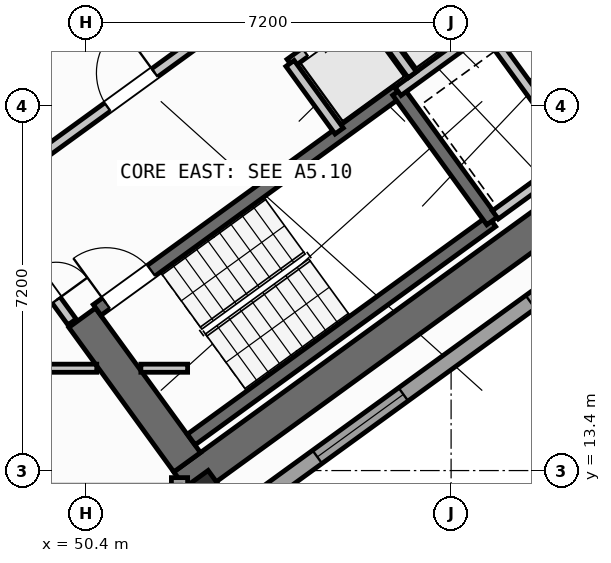
"""IFC4 building model, lengths in metres.
Left out: names, types, materials, properties, quantities, classifications, styles, units other than length and angle.
Written with IfcOpenShell. Run it as: python <this file> out.ifc"""

import sys

from ifc_helpers import new_model, si_unit, direction, frame, frame_2d, origin, origin_2d, place, context, subcontext, project, spatial, rectangle, hollow_rectangle, extrude, source, transform, mapped, element, fill, save


model = new_model("IFC4")
c1 = context("Model", 3, precision=1e-05, world=origin(), true_north=direction((0.0, 1.0)))
c2 = subcontext(c1, "Body", "Model", "MODEL_VIEW")
j1 = project(units=[si_unit("LENGTHUNIT", "METRE"), si_unit("PLANEANGLEUNIT", "RADIAN")], contexts=[c1])
p1 = place(None, origin())
s1 = spatial("IfcSite", under=j1, at=p1, CompositionType="ELEMENT")
p2 = place(p1, origin())
s2 = spatial("IfcBuilding", under=s1, at=p2, CompositionType="ELEMENT")
p3 = place(p2, frame((0.0, 0.0, 97.2)))
s3 = spatial("IfcBuildingStorey", under=s2, at=p3, CompositionType="ELEMENT", Elevation=97.2)
p4 = place(p3, frame((52.318, 13.11, 0.0), z_axis=(0.0, 0.0, 1.0), x_axis=(0.809019445368, 0.587781878776, 0.0)))
e1 = element("IfcWall", 1, at=p4, inside=s3, PredefinedType="SHEAR", context=c2, shape_type="SweptSolid", body=[
    extrude(rectangle(XDim=12.44, YDim=0.65, at=frame_2d((6.22, 0.0))), origin(), (0.0, 0.0, 1.0), 3.32),
])
p5 = place(p3, frame((52.39, 13.564, 0.0), z_axis=(0.0, 0.0, 1.0), x_axis=(-0.58779688989, 0.809008539037, 0.0)))
e2 = element("IfcWall", 2, at=p5, inside=s3, PredefinedType="SHEAR", context=c2, shape_type="SweptSolid", body=[
    extrude(rectangle(XDim=3.525, YDim=0.65, at=frame_2d((1.763, 0.0))), origin(), (0.0, 0.0, 1.0), 3.32),
])
m1 = source(origin(), c2, "Body", "SweptSolid", [
    extrude(hollow_rectangle(XDim=0.9, YDim=0.9, WallThickness=0.036, at=origin_2d()), origin(), (0.0, 0.0, 1.0), 3.6),
])
p6 = place(p3, frame((52.705, 12.773, 0.0), z_axis=(0.0, 0.0, 1.0), x_axis=(0.809016994375, 0.587785252292, 0.0)))
e3 = element("IfcColumn", 3, at=p6, inside=s3, PredefinedType="COLUMN", context=c2, shape_type="MappedRepresentation", body=[
    mapped(m1, transform((0.0, 0.0, 0.0), scale=1.0)),
])
p7 = place(p3, frame((67.454, 22.747, 0.0), z_axis=(0.0, 0.0, 1.0), x_axis=(-0.809021120468, -0.587779573171, 0.0)))
e4 = element("IfcWall", 4, at=p7, inside=s3, PredefinedType="STANDARD", context=c2, shape_type="SweptSolid", body=[
    extrude(rectangle(XDim=17.588, YDim=0.32, at=frame_2d((8.794, 0.0))), origin(), (0.0, 0.0, 1.0), 3.32),
])
p8 = place(p7, frame((1.624, 0.0, 0.0)))
e5 = element("IfcOpeningElement", 5, at=p8, cuts=e4, PredefinedType="OPENING", context=c2, shape_type="SweptSolid", body=[
    extrude(rectangle(XDim=1.05, YDim=2.15, at=frame_2d((0.525, 1.075))), frame((0.0, 0.17, 0.0), z_axis=(0.0, -1.0, 0.0), x_axis=(1.0, 0.0, 0.0)), (0.0, 0.0, 1.0), 0.34),
])
p9 = place(p7, frame((8.144, 0.0, 0.8)))
e6 = element("IfcOpeningElement", 6, at=p9, cuts=e4, PredefinedType="OPENING", context=c2, shape_type="SweptSolid", body=[
    extrude(rectangle(XDim=2.1, YDim=1.55, at=frame_2d((1.05, 0.775))), frame((0.0, 0.17, 0.0), z_axis=(0.0, -1.0, 0.0), x_axis=(1.0, 0.0, 0.0)), (0.0, 0.0, 1.0), 0.34),
])
p10 = place(p7, frame((13.344, 0.0, 0.8)))
e7 = element("IfcOpeningElement", 7, at=p10, cuts=e4, PredefinedType="OPENING", context=c2, shape_type="SweptSolid", body=[
    extrude(rectangle(XDim=2.1, YDim=1.55, at=frame_2d((1.05, 0.775))), frame((0.0, 0.17, 0.0), z_axis=(0.0, -1.0, 0.0), x_axis=(1.0, 0.0, 0.0)), (0.0, 0.0, 1.0), 0.34),
])
p11 = place(p3, frame((52.24, 13.261, 0.0), z_axis=(0.0, 0.0, 1.0), x_axis=(0.0, -1.0, 0.0)))
e8 = element("IfcWall", 8, at=p11, inside=s3, PredefinedType="STANDARD", context=c2, shape_type="SweptSolid", body=[
    extrude(rectangle(XDim=9.795, YDim=0.32, at=frame_2d((4.897, 0.0))), origin(), (0.0, 0.0, 1.0), 3.32),
])
p12 = place(p11, frame((2.307, 0.0, 0.8)))
e9 = element("IfcOpeningElement", 9, at=p12, cuts=e8, PredefinedType="OPENING", context=c2, shape_type="SweptSolid", body=[
    extrude(rectangle(XDim=2.1, YDim=1.55, at=frame_2d((1.05, 0.775))), frame((0.0, 0.17, 0.0), z_axis=(0.0, -1.0, 0.0), x_axis=(1.0, 0.0, 0.0)), (0.0, 0.0, 1.0), 0.34),
])
p13 = place(p11, frame((7.03, 0.0, 0.85)))
e10 = element("IfcOpeningElement", 10, at=p13, cuts=e8, PredefinedType="OPENING", context=c2, shape_type="SweptSolid", body=[
    extrude(rectangle(XDim=1.8, YDim=1.5, at=frame_2d((0.9, 0.75))), frame((0.0, 0.17, 0.0), z_axis=(0.0, -1.0, 0.0), x_axis=(1.0, 0.0, 0.0)), (0.0, 0.0, 1.0), 0.34),
])
p14 = place(p3, frame((52.472, 14.013, 0.0), z_axis=(0.0, 0.0, 1.0), x_axis=(0.809028366311, 0.587769599847, 0.0)))
e11 = element("IfcWall", 11, at=p14, inside=s3, PredefinedType="SHEAR", context=c2, shape_type="SweptSolid", body=[
    extrude(rectangle(XDim=7.33, YDim=0.26, at=frame_2d((3.665, 0.0))), origin(), (0.0, 0.0, 1.0), 3.32),
])
p15 = place(p3, frame((50.615, 16.57, 0.0), z_axis=(0.0, 0.0, 1.0), x_axis=(0.809028366311, 0.587769599847, 0.0)))
e12 = element("IfcWall", 12, at=p15, inside=s3, PredefinedType="SHEAR", context=c2, shape_type="SweptSolid", body=[
    extrude(rectangle(XDim=7.33, YDim=0.26, at=frame_2d((3.665, 0.0))), origin(), (0.0, 0.0, 1.0), 3.32),
])
p16 = place(p15, frame((0.22, 0.0, 0.0)))
e13 = element("IfcOpeningElement", 13, at=p16, cuts=e12, PredefinedType="OPENING", context=c2, shape_type="SweptSolid", body=[
    extrude(rectangle(XDim=1.1, YDim=2.1, at=frame_2d((0.55, 1.05))), frame((0.0, 0.14, 0.0), z_axis=(0.0, -1.0, 0.0), x_axis=(1.0, 0.0, 0.0)), (0.0, 0.0, 1.0), 0.28),
])
p17 = place(p3, frame((58.41, 18.327, 0.0), z_axis=(0.0, 0.0, 1.0), x_axis=(-0.58776738483, 0.809029975545, 0.0)))
e14 = element("IfcWall", 14, at=p17, inside=s3, PredefinedType="SHEAR", context=c2, shape_type="SweptSolid", body=[
    extrude(rectangle(XDim=3.16, YDim=0.26, at=frame_2d((1.58, 0.0))), origin(), (0.0, 0.0, 1.0), 3.32),
])
p18 = place(p3, frame((47.106, 21.437, 0.0), z_axis=(0.0, 0.0, 1.0), x_axis=(0.809012514015, 0.58779141893, 0.0)))
e15 = element("IfcWall", 15, at=p18, inside=s3, PredefinedType="STANDARD", context=c2, shape_type="SweptSolid", body=[
    extrude(rectangle(XDim=3.398, YDim=0.2, at=frame_2d((1.699, 0.0))), origin(), (0.0, 0.0, 1.0), 3.31),
])
p19 = place(p18, frame((0.408, 0.0, 0.0)))
e16 = element("IfcOpeningElement", 16, at=p19, cuts=e15, PredefinedType="OPENING", context=c2, shape_type="SweptSolid", body=[
    extrude(rectangle(XDim=1.3, YDim=2.2, at=frame_2d((0.65, 1.1))), frame((0.0, 0.11, 0.0), z_axis=(0.0, -1.0, 0.0), x_axis=(1.0, 0.0, 0.0)), (0.0, 0.0, 1.0), 0.22),
])
p20 = place(p3, frame((48.799, 19.107, 0.0), z_axis=(0.0, 0.0, 1.0), x_axis=(0.809012959416, 0.587790805897, 0.0)))
e17 = element("IfcWall", 17, at=p20, inside=s3, PredefinedType="STANDARD", context=c2, shape_type="SweptSolid", body=[
    extrude(rectangle(XDim=5.718, YDim=0.2, at=frame_2d((2.859, 0.0))), origin(), (0.0, 0.0, 1.0), 3.31),
])
p21 = place(p20, frame((2.498, 0.0, 0.0)))
e18 = element("IfcOpeningElement", 18, at=p21, cuts=e17, PredefinedType="OPENING", context=c2, shape_type="SweptSolid", body=[
    extrude(rectangle(XDim=1.15, YDim=2.1, at=frame_2d((0.575, 1.05))), frame((0.0, 0.11, 0.0), z_axis=(0.0, -1.0, 0.0), x_axis=(1.0, 0.0, 0.0)), (0.0, 0.0, 1.0), 0.22),
])
p22 = place(p3, frame((56.553, 20.884, 0.0), z_axis=(0.0, 0.0, 1.0), x_axis=(0.809035789462, 0.587759382205, 0.0)))
e19 = element("IfcWall", 19, at=p22, inside=s3, PredefinedType="STANDARD", context=c2, shape_type="SweptSolid", body=[
    extrude(rectangle(XDim=3.768, YDim=0.2, at=frame_2d((1.884, 0.0))), origin(), (0.0, 0.0, 1.0), 3.31),
])
p23 = place(p22, frame((2.65, 0.0, 0.0)))
e20 = element("IfcOpeningElement", 20, at=p23, cuts=e19, PredefinedType="OPENING", context=c2, shape_type="SweptSolid", body=[
    extrude(rectangle(XDim=0.86, YDim=2.05, at=frame_2d((0.43, 1.025))), frame((0.0, 0.11, 0.0), z_axis=(0.0, -1.0, 0.0), x_axis=(1.0, 0.0, 0.0)), (0.0, 0.0, 1.0), 0.22),
])
p24 = place(p3, frame((54.421, 21.436, 0.0), z_axis=(0.0, 0.0, 1.0), x_axis=(0.809013710463, 0.587789772183, 0.0)))
e21 = element("IfcWall", 21, at=p24, inside=s3, PredefinedType="STANDARD", context=c2, shape_type="SweptSolid", body=[
    extrude(rectangle(XDim=5.36, YDim=0.2, at=frame_2d((2.68, 0.0))), origin(), (0.0, 0.0, 1.0), 3.31),
])
p25 = place(p24, frame((0.37, 0.0, 0.0)))
e22 = element("IfcOpeningElement", 22, at=p25, cuts=e21, PredefinedType="OPENING", context=c2, shape_type="SweptSolid", body=[
    extrude(rectangle(XDim=1.1, YDim=2.15, at=frame_2d((0.55, 1.075))), frame((0.0, 0.11, 0.0), z_axis=(0.0, -1.0, 0.0), x_axis=(1.0, 0.0, 0.0)), (0.0, 0.0, 1.0), 0.22),
])
p26 = place(p24, frame((2.17, 0.0, 0.0)))
e23 = element("IfcOpeningElement", 23, at=p26, cuts=e21, PredefinedType="OPENING", context=c2, shape_type="SweptSolid", body=[
    extrude(rectangle(XDim=1.1, YDim=2.15, at=frame_2d((0.55, 1.075))), frame((0.0, 0.11, 0.0), z_axis=(0.0, -1.0, 0.0), x_axis=(1.0, 0.0, 0.0)), (0.0, 0.0, 1.0), 0.22),
])
p27 = place(p24, frame((3.97, 0.0, 0.0)))
e24 = element("IfcOpeningElement", 24, at=p27, cuts=e21, PredefinedType="OPENING", context=c2, shape_type="SweptSolid", body=[
    extrude(rectangle(XDim=1.1, YDim=2.15, at=frame_2d((0.55, 1.075))), frame((0.0, 0.11, 0.0), z_axis=(0.0, -1.0, 0.0), x_axis=(1.0, 0.0, 0.0)), (0.0, 0.0, 1.0), 0.22),
])
p28 = place(p3, frame((55.391, 20.102, 0.0), z_axis=(0.0, 0.0, 1.0), x_axis=(-0.58778447739, 0.809017557374, 0.0)))
e25 = element("IfcWall", 25, at=p28, inside=s3, PredefinedType="STANDARD", context=c2, shape_type="SweptSolid", body=[
    extrude(rectangle(XDim=1.65, YDim=0.2, at=frame_2d((0.825, 0.0))), origin(), (0.0, 0.0, 1.0), 3.31),
])
p29 = place(p3, frame((56.834, 21.212, 0.0), z_axis=(0.0, 0.0, 1.0), x_axis=(-0.58776738483, 0.809029975545, 0.0)))
e26 = element("IfcWall", 26, at=p29, inside=s3, PredefinedType="STANDARD", context=c2, shape_type="SweptSolid", body=[
    extrude(rectangle(XDim=1.58, YDim=0.2, at=frame_2d((0.79, 0.0))), origin(), (0.0, 0.0, 1.0), 3.31),
])
p30 = place(p3, frame((60.067, 19.655, 0.0), z_axis=(0.0, 0.0, 1.0), x_axis=(-0.587800520745, 0.809005900975, 0.0)))
e27 = element("IfcWall", 27, at=p30, inside=s3, PredefinedType="STANDARD", context=c2, shape_type="SweptSolid", body=[
    extrude(rectangle(XDim=2.66, YDim=0.2, at=frame_2d((1.33, 0.0))), origin(), (0.0, 0.0, 1.0), 3.31),
])
p31 = place(p3, frame((58.472, 18.447, 0.0), z_axis=(0.0, 0.0, 1.0), x_axis=(0.809022487728, 0.587777691266, 0.0)))
e28 = element("IfcWall", 28, at=p31, inside=s3, PredefinedType="STANDARD", context=c2, shape_type="SweptSolid", body=[
    extrude(rectangle(XDim=3.648, YDim=0.2, at=frame_2d((1.824, 0.0))), origin(), (0.0, 0.0, 1.0), 3.31),
])
p32 = place(p3, frame((35.296, 15.42, 0.0), z_axis=(0.0, 0.0, 1.0), x_axis=(1.0, 0.0, 0.0)))
e29 = element("IfcWall", 29, at=p32, inside=s3, PredefinedType="PARTITIONING", context=c2, shape_type="SweptSolid", body=[
    extrude(rectangle(XDim=15.311, YDim=0.16, at=frame_2d((7.655, 0.0))), origin(), (0.0, 0.0, 1.0), 3.31),
])
p33 = place(p32, frame((0.615, 0.0, 0.0)))
e30 = element("IfcOpeningElement", 30, at=p33, cuts=e29, PredefinedType="OPENING", context=c2, shape_type="SweptSolid", body=[
    extrude(rectangle(XDim=1.0, YDim=2.1, at=frame_2d((0.5, 1.05))), frame((0.0, 0.09, 0.0), z_axis=(0.0, -1.0, 0.0), x_axis=(1.0, 0.0, 0.0)), (0.0, 0.0, 1.0), 0.18),
])
p34 = place(p32, frame((9.035, 0.0, 0.0)))
e31 = element("IfcOpeningElement", 31, at=p34, cuts=e29, PredefinedType="OPENING", context=c2, shape_type="SweptSolid", body=[
    extrude(rectangle(XDim=1.0, YDim=2.1, at=frame_2d((0.5, 1.05))), frame((0.0, 0.09, 0.0), z_axis=(0.0, -1.0, 0.0), x_axis=(1.0, 0.0, 0.0)), (0.0, 0.0, 1.0), 0.18),
])
p35 = place(p3, frame((51.477, 15.42, 0.0), z_axis=(0.0, 0.0, 1.0), x_axis=(1.0, 0.0, 0.0)))
e32 = element("IfcWall", 32, at=p35, inside=s3, PredefinedType="PARTITIONING", context=c2, shape_type="SweptSolid", body=[
    extrude(rectangle(XDim=0.923, YDim=0.16, at=frame_2d((0.461, 0.0))), origin(), (0.0, 0.0, 1.0), 3.31),
])
p36 = place(p3, frame((50.119, 16.333, 0.0), z_axis=(0.0, 0.0, 1.0), x_axis=(-0.587749856981, 0.809042709391, 0.0)))
e33 = element("IfcWall", 33, at=p36, inside=s3, PredefinedType="STANDARD", context=c2, shape_type="SweptSolid", body=[
    extrude(rectangle(XDim=2.96, YDim=0.2, at=frame_2d((1.48, 0.0))), origin(), (0.0, 0.0, 1.0), 3.31),
])
p37 = place(p36, frame((0.53, 0.0, 0.0)))
e34 = element("IfcOpeningElement", 34, at=p37, cuts=e33, PredefinedType="OPENING", context=c2, shape_type="SweptSolid", body=[
    extrude(rectangle(XDim=1.5, YDim=2.15, at=frame_2d((0.75, 1.075))), frame((0.0, 0.11, 0.0), z_axis=(0.0, -1.0, 0.0), x_axis=(1.0, 0.0, 0.0)), (0.0, 0.0, 1.0), 0.22),
])
m2 = source(origin(), c2, "Body", "SweptSolid", [
    extrude(rectangle(XDim=2.1, YDim=1.55, at=frame_2d((1.05, 0.775))), frame((0.0, 0.03, 0.0), z_axis=(0.0, -1.0, 0.0), x_axis=(1.0, 0.0, 0.0)), (0.0, 0.0, 1.0), 0.06),
])
p38 = place(p9, origin())
e35 = element("IfcWindow", 35, at=p38, inside=s3, PartitioningType="SINGLE_PANEL", PredefinedType="WINDOW", context=c2, shape_type="MappedRepresentation", body=[
    mapped(m2, transform((0.0, 0.0, 0.0), scale=1.0)),
])
fill(e6, e35)
p39 = place(p10, origin())
e36 = element("IfcWindow", 36, at=p39, inside=s3, PartitioningType="SINGLE_PANEL", PredefinedType="WINDOW", context=c2, shape_type="MappedRepresentation", body=[
    mapped(m2, transform((0.0, 0.0, 0.0), scale=1.0)),
])
fill(e7, e36)
m3 = source(origin(), c2, "Body", "SweptSolid", [
    extrude(rectangle(XDim=1.1, YDim=2.1, at=frame_2d((0.55, 1.05))), frame((0.0, 0.025, 0.0), z_axis=(0.0, -1.0, 0.0), x_axis=(1.0, 0.0, 0.0)), (0.0, 0.0, 1.0), 0.05),
])
p40 = place(p16, origin())
e37 = element("IfcDoor", 37, at=p40, inside=s3, OperationType="SINGLE_SWING_LEFT", PredefinedType="DOOR", context=c2, shape_type="MappedRepresentation", body=[
    mapped(m3, transform((0.0, 0.0, 0.0), scale=1.0)),
])
fill(e13, e37)
m4 = source(origin(), c2, "Body", "SweptSolid", [
    extrude(rectangle(XDim=1.15, YDim=2.1, at=frame_2d((0.575, 1.05))), frame((0.0, 0.025, 0.0), z_axis=(0.0, -1.0, 0.0), x_axis=(1.0, 0.0, 0.0)), (0.0, 0.0, 1.0), 0.05),
])
p41 = place(p21, origin())
e38 = element("IfcDoor", 38, at=p41, inside=s3, OperationType="SINGLE_SWING_RIGHT", PredefinedType="DOOR", context=c2, shape_type="MappedRepresentation", body=[
    mapped(m4, transform((0.0, 0.0, 0.0), scale=1.0)),
])
fill(e18, e38)
m5 = source(origin(), c2, "Body", "SweptSolid", [
    extrude(rectangle(XDim=1.1, YDim=2.15, at=frame_2d((0.55, 1.075))), frame((0.0, 0.025, 0.0), z_axis=(0.0, -1.0, 0.0), x_axis=(1.0, 0.0, 0.0)), (0.0, 0.0, 1.0), 0.05),
])
p42 = place(p25, origin())
e39 = element("IfcDoor", 39, at=p42, inside=s3, OperationType="DOUBLE_DOOR_SLIDING", PredefinedType="DOOR", context=c2, shape_type="MappedRepresentation", body=[
    mapped(m5, transform((0.0, 0.0, 0.0), scale=1.0)),
])
fill(e22, e39)
m6 = source(origin(), c2, "Body", "SweptSolid", [
    extrude(rectangle(XDim=1.5, YDim=2.15, at=frame_2d((0.75, 1.075))), frame((0.0, 0.025, 0.0), z_axis=(0.0, -1.0, 0.0), x_axis=(1.0, 0.0, 0.0)), (0.0, 0.0, 1.0), 0.05),
])
p43 = place(p37, frame((1.5, 0.0, 0.0), z_axis=(0.0, 0.0, 1.0), x_axis=(-1.0, 0.0, 0.0)))
e40 = element("IfcDoor", 40, at=p43, inside=s3, OperationType="DOUBLE_DOOR_SINGLE_SWING", PredefinedType="DOOR", context=c2, shape_type="MappedRepresentation", body=[
    mapped(m6, transform((0.0, 0.0, 0.0), scale=1.0)),
])
fill(e34, e40)
save(model, sys.argv[1])
